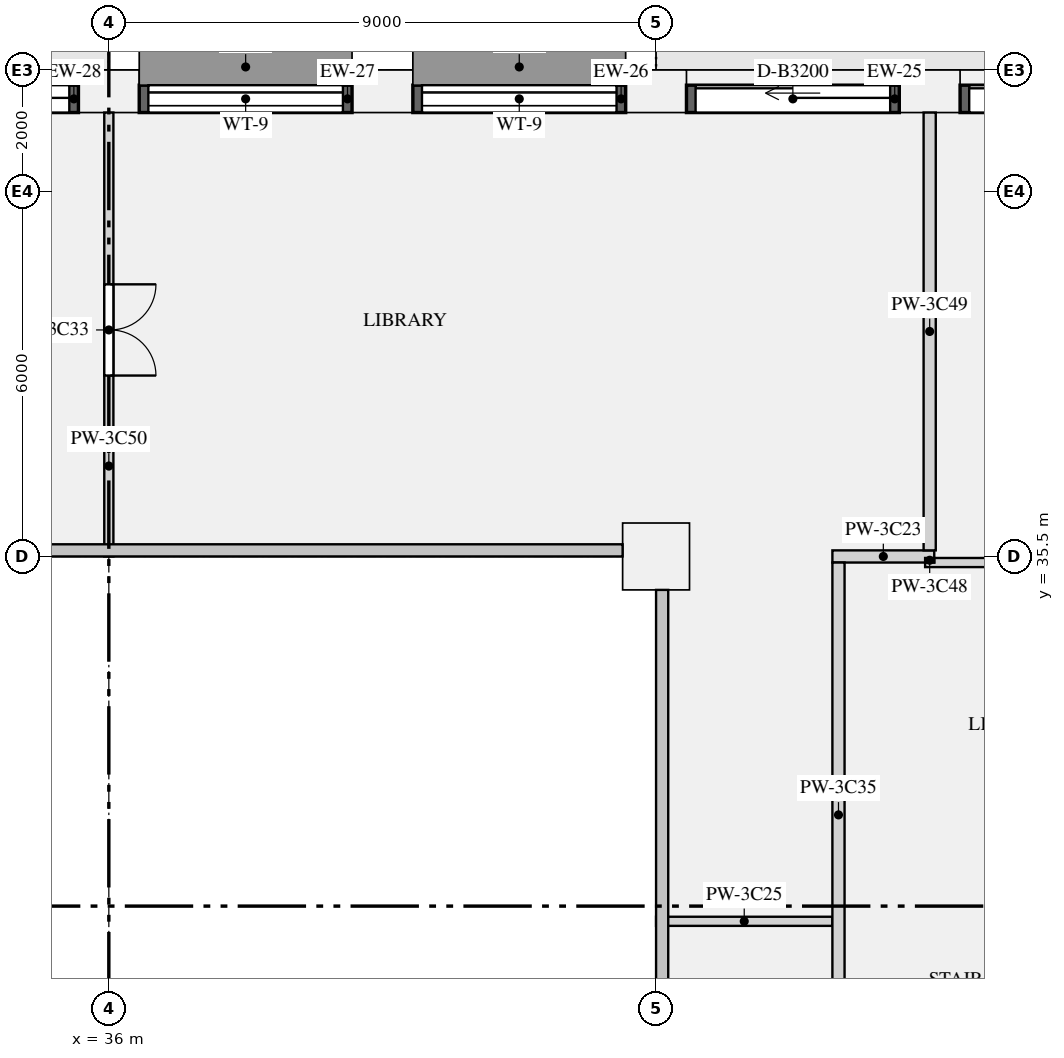
"""IFC4 building model, lengths in metres.
Left out: names, types, materials, properties, quantities, classifications, styles, units other than length and angle.
Written with IfcOpenShell. Run it as: python <this file> out.ifc"""

import sys

from ifc_helpers import new_model, si_unit, direction, frame, frame_2d, origin, origin_2d, place, context, subcontext, project, spatial, rectangle, extrude, element, fill, save


model = new_model("IFC4")
c1 = context("Model", 3, precision=1e-05, world=origin(), true_north=direction((0.0, 1.0)))
c2 = subcontext(c1, "Body", "Model", "MODEL_VIEW")
j1 = project(units=[si_unit("LENGTHUNIT", "METRE"), si_unit("PLANEANGLEUNIT", "RADIAN")], contexts=[c1])
p1 = place(None, origin())
s1 = spatial("IfcSite", under=j1, at=p1, CompositionType="ELEMENT")
p2 = place(p1, origin())
s2 = spatial("IfcBuilding", under=s1, at=p2, CompositionType="ELEMENT")
p3 = place(p2, frame((0.0, 0.0, 160.2)))
s3 = spatial("IfcBuildingStorey", under=s2, at=p3, CompositionType="ELEMENT", Elevation=160.2)
for number, where, z_axis, x_axis in (
    (1, (49.5, 43.15, 0.0), (0.0, 0.0, 1.0), (-1.0, 0.0, 0.0)),
    (2, (45.0, 43.15, 0.0), (0.0, 0.0, 1.0), (-1.0, 0.0, 0.0)),
    (3, (40.5, 43.15, 0.0), (0.0, 0.0, 1.0), (-1.0, 0.0, 0.0)),
    (4, (36.0, 43.15, 0.0), (0.0, 0.0, 1.0), (-1.0, 0.0, 0.0)),
):
    element("IfcColumn", number, at=place(p3, frame(where, z_axis=z_axis, x_axis=x_axis)), inside=s3, PredefinedType="USERDEFINED", context=c2, shape_type="SweptSolid", body=[
        extrude(rectangle(XDim=1.0, YDim=0.7, at=origin_2d()), origin(), (0.0, 0.0, 1.0), 3.15),
    ])
p4 = place(p3, frame((45.0, 35.5, 0.0), z_axis=(0.0, 0.0, 1.0), x_axis=(1.0, 0.0, 0.0)))
e5 = element("IfcColumn", 5, at=p4, inside=s3, PredefinedType="COLUMN", context=c2, shape_type="SweptSolid", body=[
    extrude(rectangle(XDim=1.1, YDim=1.1, at=origin_2d()), origin(), (0.0, 0.0, 1.0), 3.15),
])
p5 = place(p3, frame((53.5, 43.025, 0.0), z_axis=(0.0, 0.0, 1.0), x_axis=(-1.0, 0.0, 0.0)))
e6 = element("IfcWall", 6, at=p5, inside=s3, PredefinedType="SOLIDWALL", context=c2, shape_type="SweptSolid", body=[
    extrude(rectangle(XDim=3.5, YDim=0.45, at=frame_2d((1.75, 0.0))), origin(), (0.0, 0.0, 1.0), 2.83),
])
p6 = place(p5, frame((0.15, 0.0, 0.0)))
e7 = element("IfcOpeningElement", 7, at=p6, cuts=e6, PredefinedType="OPENING", context=c2, shape_type="SweptSolid", body=[
    extrude(rectangle(XDim=3.2, YDim=2.3, at=frame_2d((1.6, 1.15))), frame((0.0, 0.235, 0.0), z_axis=(0.0, -1.0, 0.0), x_axis=(1.0, 0.0, 0.0)), (0.0, 0.0, 1.0), 0.47),
])
p7 = place(p3, frame((49.0, 43.025, 0.0), z_axis=(0.0, 0.0, 1.0), x_axis=(-1.0, 0.0, 0.0)))
e8 = element("IfcWall", 8, at=p7, inside=s3, PredefinedType="SOLIDWALL", context=c2, shape_type="SweptSolid", body=[
    extrude(rectangle(XDim=3.5, YDim=0.45, at=frame_2d((1.75, 0.0))), origin(), (0.0, 0.0, 1.0), 2.83),
])
p8 = place(p7, frame((0.15, 0.0, 0.0)))
e9 = element("IfcOpeningElement", 9, at=p8, cuts=e8, PredefinedType="OPENING", context=c2, shape_type="SweptSolid", body=[
    extrude(rectangle(XDim=3.2, YDim=2.3, at=frame_2d((1.6, 1.15))), frame((0.0, 0.235, 0.0), z_axis=(0.0, -1.0, 0.0), x_axis=(1.0, 0.0, 0.0)), (0.0, 0.0, 1.0), 0.47),
])
p9 = place(p3, frame((44.5, 43.025, 0.9), z_axis=(0.0, 0.0, 1.0), x_axis=(-1.0, 0.0, 0.0)))
e10 = element("IfcWall", 10, at=p9, inside=s3, PredefinedType="SOLIDWALL", context=c2, shape_type="SweptSolid", body=[
    extrude(rectangle(XDim=3.5, YDim=0.45, at=frame_2d((1.75, 0.0))), origin(), (0.0, 0.0, 1.0), 1.93),
])
p10 = place(p9, frame((0.15, 0.0, 0.15)))
e11 = element("IfcOpeningElement", 11, at=p10, cuts=e10, PredefinedType="OPENING", context=c2, shape_type="SweptSolid", body=[
    extrude(rectangle(XDim=3.2, YDim=1.5, at=frame_2d((1.6, 0.75))), frame((0.0, 0.235, 0.0), z_axis=(0.0, -1.0, 0.0), x_axis=(1.0, 0.0, 0.0)), (0.0, 0.0, 1.0), 0.47),
])
p11 = place(p3, frame((40.0, 43.025, 0.9), z_axis=(0.0, 0.0, 1.0), x_axis=(-1.0, 0.0, 0.0)))
e12 = element("IfcWall", 12, at=p11, inside=s3, PredefinedType="SOLIDWALL", context=c2, shape_type="SweptSolid", body=[
    extrude(rectangle(XDim=3.5, YDim=0.45, at=frame_2d((1.75, 0.0))), origin(), (0.0, 0.0, 1.0), 1.93),
])
p12 = place(p11, frame((0.15, 0.0, 0.15)))
e13 = element("IfcOpeningElement", 13, at=p12, cuts=e12, PredefinedType="OPENING", context=c2, shape_type="SweptSolid", body=[
    extrude(rectangle(XDim=3.2, YDim=1.5, at=frame_2d((1.6, 0.75))), frame((0.0, 0.235, 0.0), z_axis=(0.0, -1.0, 0.0), x_axis=(1.0, 0.0, 0.0)), (0.0, 0.0, 1.0), 0.47),
])
p13 = place(p3, frame((35.5, 43.025, 0.0), z_axis=(0.0, 0.0, 1.0), x_axis=(-1.0, 0.0, 0.0)))
e14 = element("IfcWall", 14, at=p13, inside=s3, PredefinedType="SOLIDWALL", context=c2, shape_type="SweptSolid", body=[
    extrude(rectangle(XDim=3.5, YDim=0.45, at=frame_2d((1.75, 0.0))), origin(), (0.0, 0.0, 1.0), 2.83),
])
p14 = place(p13, frame((0.15, 0.0, 0.0)))
e15 = element("IfcOpeningElement", 15, at=p14, cuts=e14, PredefinedType="OPENING", context=c2, shape_type="SweptSolid", body=[
    extrude(rectangle(XDim=3.2, YDim=2.3, at=frame_2d((1.6, 1.15))), frame((0.0, 0.235, 0.0), z_axis=(0.0, -1.0, 0.0), x_axis=(1.0, 0.0, 0.0)), (0.0, 0.0, 1.0), 0.47),
])
p15 = place(p3, frame((49.425, 35.4, 0.0), z_axis=(0.0, 0.0, 1.0), x_axis=(1.0, 0.0, 0.0)))
e16 = element("IfcWall", 16, at=p15, inside=s3, PredefinedType="PARTITIONING", context=c2, shape_type="SweptSolid", body=[
    extrude(rectangle(XDim=6.775, YDim=0.15, at=frame_2d((3.387, 0.0))), origin(), (0.0, 0.0, 1.0), 2.83),
])
p16 = place(p15, frame((1.6, 0.0, 0.0)))
e17 = element("IfcOpeningElement", 17, at=p16, cuts=e16, PredefinedType="OPENING", context=c2, shape_type="SweptSolid", body=[
    extrude(rectangle(XDim=0.9, YDim=2.1, at=frame_2d((0.45, 1.05))), frame((0.0, 0.085, 0.0), z_axis=(0.0, -1.0, 0.0), x_axis=(1.0, 0.0, 0.0)), (0.0, 0.0, 1.0), 0.17),
])
p17 = place(p3, frame((47.9, 35.5, 0.0), z_axis=(0.0, 0.0, 1.0), x_axis=(1.0, 0.0, 0.0)))
e18 = element("IfcWall", 18, at=p17, inside=s3, PredefinedType="PARTITIONING", context=c2, shape_type="SweptSolid", body=[
    extrude(rectangle(XDim=1.675, YDim=0.2, at=frame_2d((0.837, 0.0))), origin(), (0.0, 0.0, 1.0), 2.83),
])
p18 = place(p3, frame((45.0, 29.5, 0.0), z_axis=(0.0, 0.0, 1.0), x_axis=(1.0, 0.0, 0.0)))
e19 = element("IfcWall", 19, at=p18, inside=s3, PredefinedType="PARTITIONING", context=c2, shape_type="SweptSolid", body=[
    extrude(rectangle(XDim=2.9, YDim=0.15, at=frame_2d((1.45, 0.0))), origin(), (0.0, 0.0, 1.0), 2.83),
])
p19 = place(p3, frame((48.0, 27.1, 0.0), z_axis=(0.0, 0.0, 1.0), x_axis=(0.0, 1.0, 0.0)))
e20 = element("IfcWall", 20, at=p19, inside=s3, PredefinedType="PARTITIONING", context=c2, shape_type="SweptSolid", body=[
    extrude(rectangle(XDim=8.3, YDim=0.2, at=frame_2d((4.15, 0.0))), origin(), (0.0, 0.0, 1.0), 2.83),
])
p20 = place(p3, frame((49.5, 35.4, 0.0), z_axis=(0.0, 0.0, 1.0), x_axis=(0.0, 1.0, 0.0)))
e21 = element("IfcWall", 21, at=p20, inside=s3, PredefinedType="PARTITIONING", context=c2, shape_type="SweptSolid", body=[
    extrude(rectangle(XDim=0.075, YDim=0.15, at=frame_2d((0.038, 0.0))), origin(), (0.0, 0.0, 1.0), 2.83),
])
p21 = place(p3, frame((49.5, 35.6, 0.0), z_axis=(0.0, 0.0, 1.0), x_axis=(0.0, 1.0, 0.0)))
e22 = element("IfcWall", 22, at=p21, inside=s3, PredefinedType="PARTITIONING", context=c2, shape_type="SweptSolid", body=[
    extrude(rectangle(XDim=7.2, YDim=0.2, at=frame_2d((3.6, 0.0))), origin(), (0.0, 0.0, 1.0), 2.83),
])
p22 = place(p3, frame((36.0, 35.5, 0.0), z_axis=(0.0, 0.0, 1.0), x_axis=(0.0, 1.0, 0.0)))
e23 = element("IfcWall", 23, at=p22, inside=s3, PredefinedType="PARTITIONING", context=c2, shape_type="SweptSolid", body=[
    extrude(rectangle(XDim=7.3, YDim=0.15, at=frame_2d((3.65, 0.0))), origin(), (0.0, 0.0, 1.0), 2.83),
])
p23 = place(p22, frame((2.975, 0.0, 0.0)))
e24 = element("IfcOpeningElement", 24, at=p23, cuts=e23, PredefinedType="OPENING", context=c2, shape_type="SweptSolid", body=[
    extrude(rectangle(XDim=1.5, YDim=2.1, at=frame_2d((0.75, 1.05))), frame((0.0, 0.085, 0.0), z_axis=(0.0, -1.0, 0.0), x_axis=(1.0, 0.0, 0.0)), (0.0, 0.0, 1.0), 0.17),
])
p24 = place(p6, origin())
e25 = element("IfcDoor", 25, at=p24, inside=s3, OperationType="SLIDING_TO_LEFT", PredefinedType="DOOR", context=c2, shape_type="SweptSolid", body=[
    extrude(rectangle(XDim=3.2, YDim=2.3, at=frame_2d((1.6, 1.15))), frame((0.0, -0.07, 0.0), z_axis=(0.0, -1.0, 0.0), x_axis=(1.0, 0.0, 0.0)), (0.0, 0.0, 1.0), 0.05),
])
fill(e7, e25)
p25 = place(p8, origin())
e26 = element("IfcDoor", 26, at=p25, inside=s3, OperationType="SLIDING_TO_LEFT", PredefinedType="DOOR", context=c2, shape_type="SweptSolid", body=[
    extrude(rectangle(XDim=3.2, YDim=2.3, at=frame_2d((1.6, 1.15))), frame((0.0, -0.07, 0.0), z_axis=(0.0, -1.0, 0.0), x_axis=(1.0, 0.0, 0.0)), (0.0, 0.0, 1.0), 0.05),
])
fill(e9, e26)
p26 = place(p10, origin())
e27 = element("IfcWindow", 27, at=p26, inside=s3, PartitioningType="SINGLE_PANEL", PredefinedType="WINDOW", context=c2, shape_type="SweptSolid", body=[
    extrude(rectangle(XDim=3.2, YDim=1.5, at=frame_2d((1.6, 0.75))), frame((0.0, -0.065, 0.0), z_axis=(0.0, -1.0, 0.0), x_axis=(1.0, 0.0, 0.0)), (0.0, 0.0, 1.0), 0.06),
])
fill(e11, e27)
p27 = place(p12, origin())
e28 = element("IfcWindow", 28, at=p27, inside=s3, PartitioningType="SINGLE_PANEL", PredefinedType="WINDOW", context=c2, shape_type="SweptSolid", body=[
    extrude(rectangle(XDim=3.2, YDim=1.5, at=frame_2d((1.6, 0.75))), frame((0.0, -0.065, 0.0), z_axis=(0.0, -1.0, 0.0), x_axis=(1.0, 0.0, 0.0)), (0.0, 0.0, 1.0), 0.06),
])
fill(e13, e28)
p28 = place(p14, origin())
e29 = element("IfcDoor", 29, at=p28, inside=s3, OperationType="SLIDING_TO_LEFT", PredefinedType="DOOR", context=c2, shape_type="SweptSolid", body=[
    extrude(rectangle(XDim=3.2, YDim=2.3, at=frame_2d((1.6, 1.15))), frame((0.0, -0.07, 0.0), z_axis=(0.0, -1.0, 0.0), x_axis=(1.0, 0.0, 0.0)), (0.0, 0.0, 1.0), 0.05),
])
fill(e15, e29)
p29 = place(p23, frame((1.5, 0.0, 0.0), z_axis=(0.0, 0.0, 1.0), x_axis=(-1.0, 0.0, 0.0)))
e30 = element("IfcDoor", 30, at=p29, inside=s3, OperationType="DOUBLE_DOOR_SINGLE_SWING", PredefinedType="DOOR", context=c2, shape_type="SweptSolid", body=[
    extrude(rectangle(XDim=1.5, YDim=2.1, at=frame_2d((0.75, 1.05))), frame((0.0, 0.025, 0.0), z_axis=(0.0, -1.0, 0.0), x_axis=(1.0, 0.0, 0.0)), (0.0, 0.0, 1.0), 0.05),
])
fill(e24, e30)
save(model, sys.argv[1])
